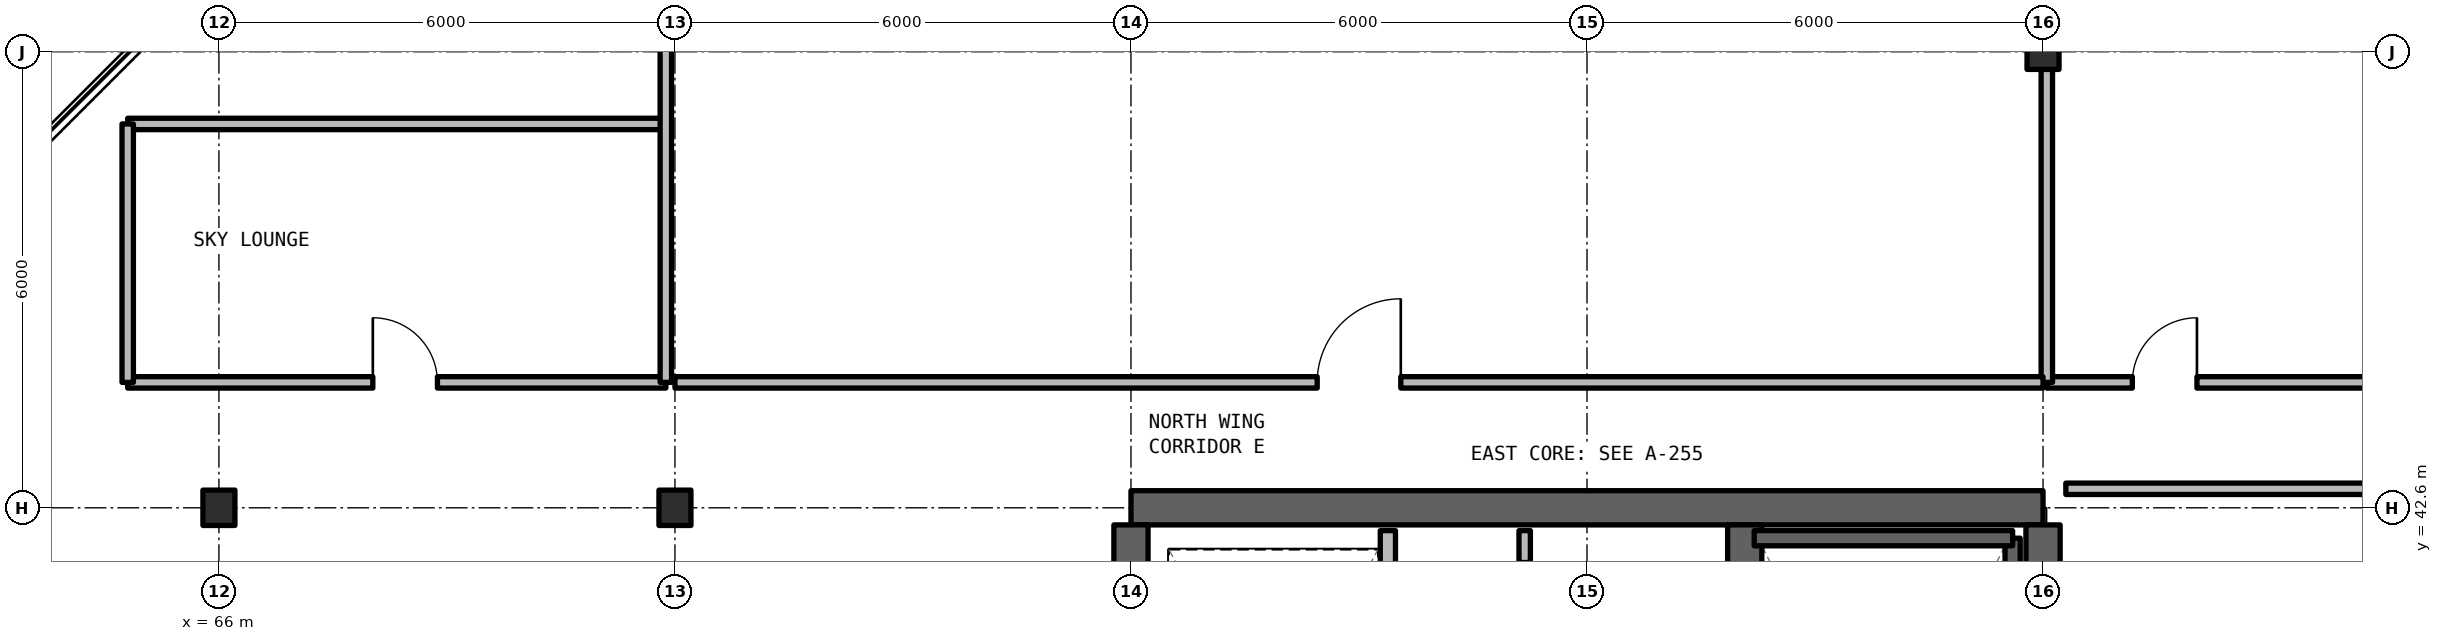
"""IFC4 building model, lengths in metres.
Left out: names, types, materials, properties, quantities, classifications, styles, units other than length and angle.
Written with IfcOpenShell. Run it as: python <this file> out.ifc"""

import sys

from ifc_helpers import new_model, si_unit, direction, frame, frame_2d, origin, origin_2d, place, context, subcontext, project, spatial, rectangle, i_section, extrude, element, fill, save


model = new_model("IFC4")
c1 = context("Model", 3, precision=1e-05, world=origin(), true_north=direction((0.0, 1.0)))
c2 = subcontext(c1, "Body", "Model", "MODEL_VIEW")
j1 = project(units=[si_unit("LENGTHUNIT", "METRE"), si_unit("PLANEANGLEUNIT", "RADIAN")], contexts=[c1])
p1 = place(None, origin())
s1 = spatial("IfcSite", under=j1, at=p1, CompositionType="ELEMENT")
p2 = place(p1, origin())
s2 = spatial("IfcBuilding", under=s1, at=p2, CompositionType="ELEMENT")
p3 = place(p2, frame((0.0, 0.0, 267.96)))
s3 = spatial("IfcBuildingStorey", under=s2, at=p3, CompositionType="ELEMENT", Elevation=267.96)
p4 = place(p3, frame((90.0, 42.6, 0.0), z_axis=(0.0, 0.0, 1.0), x_axis=(-1.0, 0.0, 0.0)))
e1 = element("IfcWall", 1, at=p4, inside=s3, PredefinedType="SHEAR", context=c2, shape_type="SweptSolid", body=[
    extrude(rectangle(XDim=12.0, YDim=0.45, at=frame_2d((6.0, 0.0))), origin(), (0.0, 0.0, 1.0), 3.63),
])
p5 = place(p3, frame((90.0, 24.825, 0.0), z_axis=(0.0, 0.0, 1.0), x_axis=(0.0, 1.0, 0.0)))
e2 = element("IfcWall", 2, at=p5, inside=s3, PredefinedType="SHEAR", context=c2, shape_type="SweptSolid", body=[
    extrude(rectangle(XDim=17.55, YDim=0.45, at=frame_2d((8.775, 0.0))), origin(), (0.0, 0.0, 1.0), 3.63),
])
p6 = place(p3, frame((78.0, 36.8, 0.0), z_axis=(0.0, 0.0, 1.0), x_axis=(0.0, 1.0, 0.0)))
e3 = element("IfcWall", 3, at=p6, inside=s3, PredefinedType="SHEAR", context=c2, shape_type="SweptSolid", body=[
    extrude(rectangle(XDim=5.575, YDim=0.45, at=frame_2d((2.788, 0.0))), origin(), (0.0, 0.0, 1.0), 3.63),
])
p7 = place(p3, frame((86.075, 24.825, 0.0), z_axis=(0.0, 0.0, 1.0), x_axis=(0.0, 1.0, 0.0)))
e4 = element("IfcWall", 4, at=p7, inside=s3, PredefinedType="SHEAR", context=c2, shape_type="SweptSolid", body=[
    extrude(rectangle(XDim=17.55, YDim=0.45, at=frame_2d((8.775, 0.0))), origin(), (0.0, 0.0, 1.0), 3.63),
])
p8 = place(p7, frame((0.425, 0.0, 0.0)))
e5 = element("IfcOpeningElement", 5, at=p8, cuts=e4, PredefinedType="OPENING", context=c2, shape_type="SweptSolid", body=[
    extrude(rectangle(XDim=1.15, YDim=2.15, at=frame_2d((0.575, 1.075))), frame((0.0, 0.235, 0.0), z_axis=(0.0, -1.0, 0.0), x_axis=(1.0, 0.0, 0.0)), (0.0, 0.0, 1.0), 0.47),
])
p9 = place(p7, frame((9.625, 0.0, 0.0)))
e6 = element("IfcOpeningElement", 6, at=p9, cuts=e4, PredefinedType="OPENING", context=c2, shape_type="SweptSolid", body=[
    extrude(rectangle(XDim=1.15, YDim=2.15, at=frame_2d((0.575, 1.075))), frame((0.0, 0.235, 0.0), z_axis=(0.0, -1.0, 0.0), x_axis=(1.0, 0.0, 0.0)), (0.0, 0.0, 1.0), 0.47),
])
for number, where, z_axis, x_axis in (
    (7, (66.0, 42.6, 0.0), (0.0, 0.0, 1.0), (1.0, 0.0, 0.0)),
    (8, (72.0, 42.6, 0.0), (0.0, 0.0, 1.0), (1.0, 0.0, 0.0)),
    (9, (90.0, 48.6, 0.0), (0.0, 0.0, 1.0), (1.0, 0.0, 0.0)),
):
    element("IfcColumn", number, at=place(p3, frame(where, z_axis=z_axis, x_axis=x_axis)), inside=s3, PredefinedType="COLUMN", context=c2, shape_type="SweptSolid", body=[
        extrude(i_section(OverallWidth=0.421, OverallDepth=0.465, WebThickness=0.045, FlangeThickness=0.07, FilletRadius=0.015, at=origin_2d()), origin(), (0.0, 0.0, 1.0), 3.63),
    ])
p10 = place(p3, frame((83.18, 36.88, 0.0), z_axis=(0.0, 0.0, 1.0), x_axis=(0.0, 1.0, 0.0)))
e10 = element("IfcWall", 10, at=p10, inside=s3, PredefinedType="SOLIDWALL", context=c2, shape_type="SweptSolid", body=[
    extrude(rectangle(XDim=5.42, YDim=0.15, at=frame_2d((2.71, 0.0))), origin(), (0.0, 0.0, 1.0), 2.63),
])
p11 = place(p10, frame((1.15, 0.0, 0.0)))
e11 = element("IfcOpeningElement", 11, at=p11, cuts=e10, PredefinedType="OPENING", context=c2, shape_type="SweptSolid", body=[
    extrude(rectangle(XDim=0.95, YDim=2.15, at=frame_2d((0.475, 1.075))), frame((0.0, 0.085, 0.0), z_axis=(0.0, -1.0, 0.0), x_axis=(1.0, 0.0, 0.0)), (0.0, 0.0, 1.0), 0.17),
])
p12 = place(p10, frame((4.05, 0.0, 0.0)))
e12 = element("IfcOpeningElement", 12, at=p12, cuts=e10, PredefinedType="OPENING", context=c2, shape_type="SweptSolid", body=[
    extrude(rectangle(XDim=0.95, YDim=2.15, at=frame_2d((0.475, 1.075))), frame((0.0, 0.085, 0.0), z_axis=(0.0, -1.0, 0.0), x_axis=(1.0, 0.0, 0.0)), (0.0, 0.0, 1.0), 0.17),
])
p13 = place(p3, frame((81.38, 36.88, 0.0), z_axis=(0.0, 0.0, 1.0), x_axis=(0.0, 1.0, 0.0)))
e13 = element("IfcWall", 13, at=p13, inside=s3, PredefinedType="SOLIDWALL", context=c2, shape_type="SweptSolid", body=[
    extrude(rectangle(XDim=5.42, YDim=0.2, at=frame_2d((2.71, 0.0))), origin(), (0.0, 0.0, 1.0), 2.63),
])
p14 = place(p13, frame((0.8, 0.0, 0.0)))
e14 = element("IfcOpeningElement", 14, at=p14, cuts=e13, PredefinedType="OPENING", context=c2, shape_type="SweptSolid", body=[
    extrude(rectangle(XDim=1.1, YDim=2.2, at=frame_2d((0.55, 1.1))), frame((0.0, 0.11, 0.0), z_axis=(0.0, -1.0, 0.0), x_axis=(1.0, 0.0, 0.0)), (0.0, 0.0, 1.0), 0.22),
])
p15 = place(p13, frame((3.3, 0.0, 0.0)))
e15 = element("IfcOpeningElement", 15, at=p15, cuts=e13, PredefinedType="OPENING", context=c2, shape_type="SweptSolid", body=[
    extrude(rectangle(XDim=1.1, YDim=2.2, at=frame_2d((0.55, 1.1))), frame((0.0, 0.11, 0.0), z_axis=(0.0, -1.0, 0.0), x_axis=(1.0, 0.0, 0.0)), (0.0, 0.0, 1.0), 0.22),
])
p16 = place(p3, frame((64.8, 44.25, 0.0), z_axis=(0.0, 0.0, 1.0), x_axis=(1.0, 0.0, 0.0)))
e16 = element("IfcWall", 16, at=p16, inside=s3, PredefinedType="SOLIDWALL", context=c2, shape_type="SweptSolid", body=[
    extrude(rectangle(XDim=7.08, YDim=0.15, at=frame_2d((3.54, 0.0))), origin(), (0.0, 0.0, 1.0), 2.63),
])
p17 = place(p16, frame((3.225, 0.0, 0.0)))
e17 = element("IfcOpeningElement", 17, at=p17, cuts=e16, PredefinedType="OPENING", context=c2, shape_type="SweptSolid", body=[
    extrude(rectangle(XDim=0.85, YDim=2.1, at=frame_2d((0.425, 1.05))), frame((0.0, 0.085, 0.0), z_axis=(0.0, -1.0, 0.0), x_axis=(1.0, 0.0, 0.0)), (0.0, 0.0, 1.0), 0.17),
])
p18 = place(p3, frame((64.8, 47.65, 0.0), z_axis=(0.0, 0.0, 1.0), x_axis=(1.0, 0.0, 0.0)))
e18 = element("IfcWall", 18, at=p18, inside=s3, PredefinedType="SOLIDWALL", context=c2, shape_type="SweptSolid", body=[
    extrude(rectangle(XDim=7.08, YDim=0.15, at=frame_2d((3.54, 0.0))), origin(), (0.0, 0.0, 1.0), 2.63),
])
p19 = place(p3, frame((64.8, 44.25, 0.0), z_axis=(0.0, 0.0, 1.0), x_axis=(0.0, 1.0, 0.0)))
e19 = element("IfcWall", 19, at=p19, inside=s3, PredefinedType="SOLIDWALL", context=c2, shape_type="SweptSolid", body=[
    extrude(rectangle(XDim=3.4, YDim=0.15, at=frame_2d((1.7, 0.0))), origin(), (0.0, 0.0, 1.0), 2.63),
])
p20 = place(p3, frame((71.88, 44.25, 0.0), z_axis=(0.0, 0.0, 1.0), x_axis=(0.0, 1.0, 0.0)))
e20 = element("IfcWall", 20, at=p20, inside=s3, PredefinedType="SOLIDWALL", context=c2, shape_type="SweptSolid", body=[
    extrude(rectangle(XDim=10.61, YDim=0.15, at=frame_2d((5.305, 0.0))), origin(), (0.0, 0.0, 1.0), 2.63),
])
p21 = place(p3, frame((90.3, 42.85, 0.0), z_axis=(0.0, 0.0, 1.0), x_axis=(1.0, 0.0, 0.0)))
e21 = element("IfcWall", 21, at=p21, inside=s3, PredefinedType="SOLIDWALL", context=c2, shape_type="SweptSolid", body=[
    extrude(rectangle(XDim=8.52, YDim=0.15, at=frame_2d((4.26, 0.0))), origin(), (0.0, 0.0, 1.0), 2.63),
])
p22 = place(p3, frame((90.05, 44.25, 0.0), z_axis=(0.0, 0.0, 1.0), x_axis=(1.0, 0.0, 0.0)))
e22 = element("IfcWall", 22, at=p22, inside=s3, PredefinedType="SOLIDWALL", context=c2, shape_type="SweptSolid", body=[
    extrude(rectangle(XDim=5.37, YDim=0.15, at=frame_2d((2.685, 0.0))), origin(), (0.0, 0.0, 1.0), 2.63),
])
p23 = place(p22, frame((1.125, 0.0, 0.0)))
e23 = element("IfcOpeningElement", 23, at=p23, cuts=e22, PredefinedType="OPENING", context=c2, shape_type="SweptSolid", body=[
    extrude(rectangle(XDim=0.85, YDim=2.1, at=frame_2d((0.425, 1.05))), frame((0.0, 0.085, 0.0), z_axis=(0.0, -1.0, 0.0), x_axis=(1.0, 0.0, 0.0)), (0.0, 0.0, 1.0), 0.17),
])
p24 = place(p3, frame((90.05, 44.25, 0.0), z_axis=(0.0, 0.0, 1.0), x_axis=(0.0, 1.0, 0.0)))
e24 = element("IfcWall", 24, at=p24, inside=s3, PredefinedType="SOLIDWALL", context=c2, shape_type="SweptSolid", body=[
    extrude(rectangle(XDim=10.61, YDim=0.15, at=frame_2d((5.305, 0.0))), origin(), (0.0, 0.0, 1.0), 2.63),
])
p25 = place(p3, frame((72.0, 44.25, 0.0), z_axis=(0.0, 0.0, 1.0), x_axis=(1.0, 0.0, 0.0)))
e25 = element("IfcWall", 25, at=p25, inside=s3, PredefinedType="SOLIDWALL", context=c2, shape_type="SweptSolid", body=[
    extrude(rectangle(XDim=18.0, YDim=0.15, at=frame_2d((9.0, 0.0))), origin(), (0.0, 0.0, 1.0), 2.63),
])
p26 = place(p25, frame((8.45, 0.0, 0.0)))
e26 = element("IfcOpeningElement", 26, at=p26, cuts=e25, PredefinedType="OPENING", context=c2, shape_type="SweptSolid", body=[
    extrude(rectangle(XDim=1.1, YDim=2.15, at=frame_2d((0.55, 1.075))), frame((0.0, 0.085, 0.0), z_axis=(0.0, -1.0, 0.0), x_axis=(1.0, 0.0, 0.0)), (0.0, 0.0, 1.0), 0.17),
])
p27 = place(p3, frame((89.6, 34.2, 0.0), z_axis=(0.0, 0.0, 1.0), x_axis=(0.0, 1.0, 0.0)))
e27 = element("IfcWall", 27, at=p27, inside=s3, PredefinedType="SOLIDWALL", context=c2, shape_type="SweptSolid", body=[
    extrude(rectangle(XDim=8.0, YDim=0.2, at=frame_2d((4.0, 0.0))), origin(), (0.0, 0.0, 1.0), 3.63),
])
p28 = place(p3, frame((89.6, 42.2, 0.0), z_axis=(0.0, 0.0, 1.0), x_axis=(-1.0, 0.0, 0.0)))
e28 = element("IfcWall", 28, at=p28, inside=s3, PredefinedType="SOLIDWALL", context=c2, shape_type="SweptSolid", body=[
    extrude(rectangle(XDim=3.4, YDim=0.2, at=frame_2d((1.7, 0.0))), origin(), (0.0, 0.0, 1.0), 3.63),
])
p29 = place(p17, origin())
e29 = element("IfcDoor", 29, at=p29, inside=s3, OperationType="SINGLE_SWING_LEFT", PredefinedType="DOOR", context=c2, shape_type="SweptSolid", body=[
    extrude(rectangle(XDim=0.85, YDim=2.1, at=frame_2d((0.425, 1.05))), frame((0.0, 0.025, 0.0), z_axis=(0.0, -1.0, 0.0), x_axis=(1.0, 0.0, 0.0)), (0.0, 0.0, 1.0), 0.05),
])
fill(e17, e29)
p30 = place(p23, origin())
e30 = element("IfcDoor", 30, at=p30, inside=s3, OperationType="SINGLE_SWING_RIGHT", PredefinedType="DOOR", context=c2, shape_type="SweptSolid", body=[
    extrude(rectangle(XDim=0.85, YDim=2.1, at=frame_2d((0.425, 1.05))), frame((0.0, 0.025, 0.0), z_axis=(0.0, -1.0, 0.0), x_axis=(1.0, 0.0, 0.0)), (0.0, 0.0, 1.0), 0.05),
])
fill(e23, e30)
p31 = place(p26, origin())
e31 = element("IfcDoor", 31, at=p31, inside=s3, OperationType="SINGLE_SWING_RIGHT", PredefinedType="DOOR", context=c2, shape_type="SweptSolid", body=[
    extrude(rectangle(XDim=1.1, YDim=2.15, at=frame_2d((0.55, 1.075))), frame((0.0, 0.025, 0.0), z_axis=(0.0, -1.0, 0.0), x_axis=(1.0, 0.0, 0.0)), (0.0, 0.0, 1.0), 0.05),
])
fill(e26, e31)
save(model, sys.argv[1])
